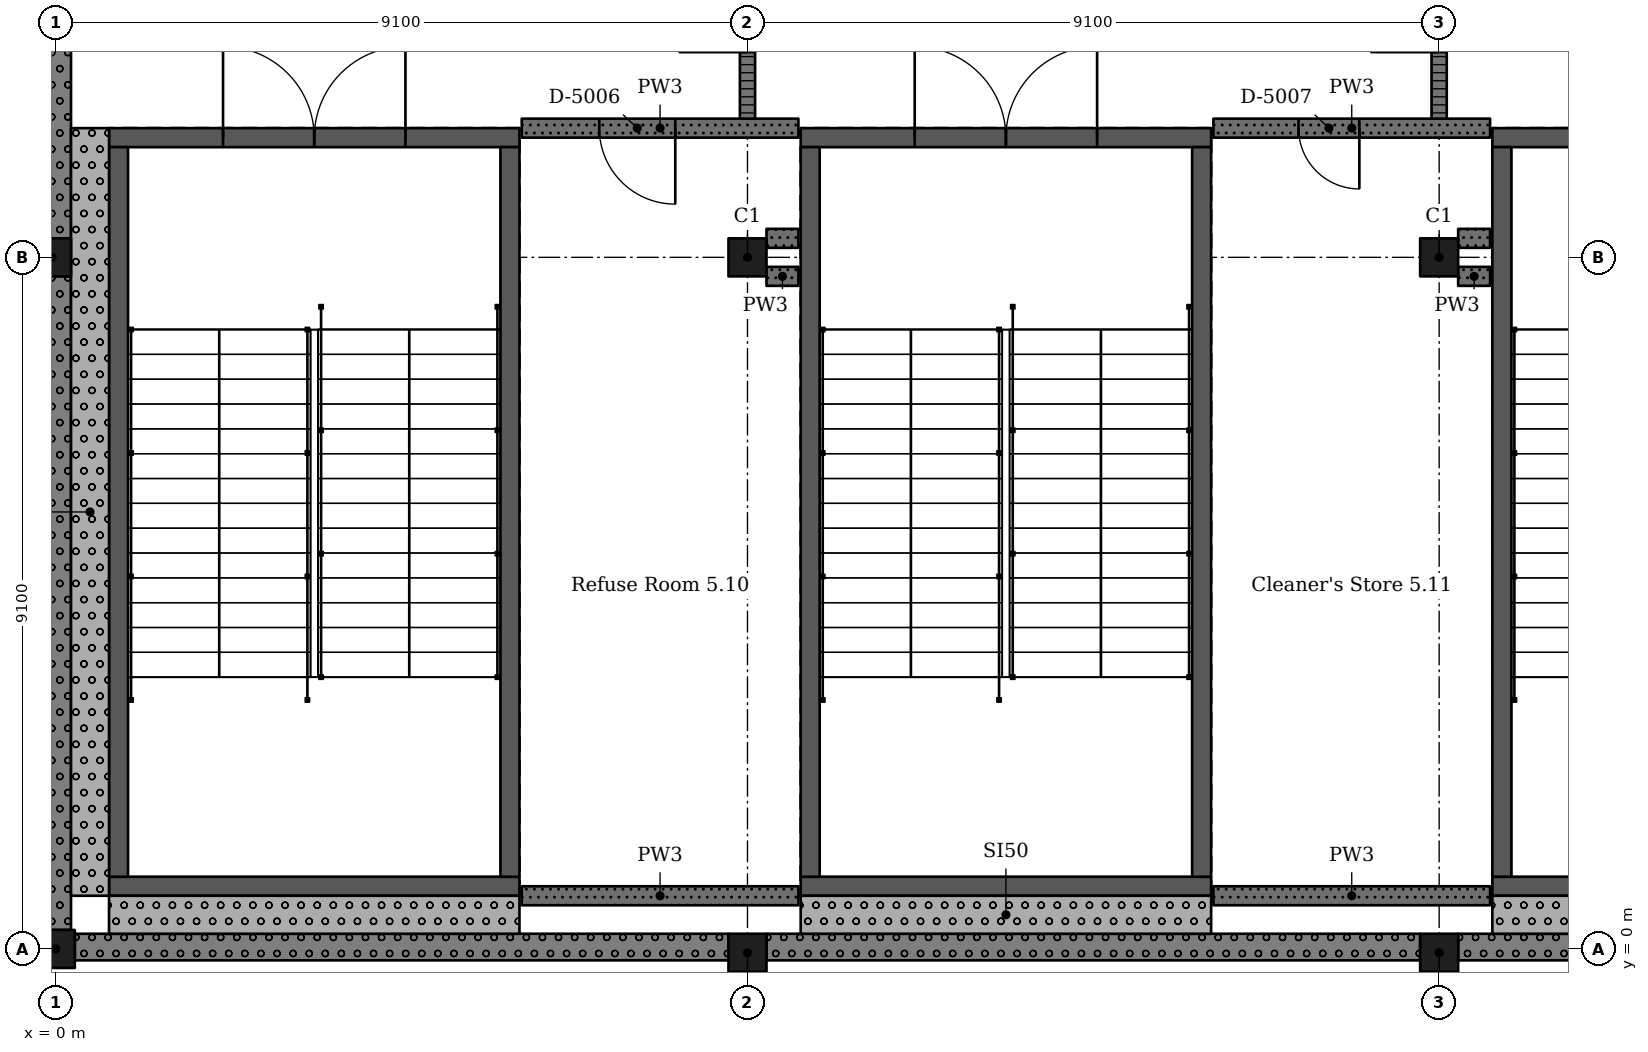
"""IFC4 building model, lengths in metres.
Left out: names, types, materials, properties, quantities, classifications, styles, units other than length and angle.
Written with IfcOpenShell. Run it as: python <this file> out.ifc"""

import sys

from ifc_helpers import new_model, si_unit, direction, frame, frame_2d, origin, origin_2d, place, context, subcontext, project, spatial, rectangle, extrude, element, fill, save


model = new_model("IFC4")
c1 = context("Model", 3, precision=1e-05, world=origin(), true_north=direction((0.0, 1.0)))
c2 = subcontext(c1, "Body", "Model", "MODEL_VIEW")
j1 = project(units=[si_unit("LENGTHUNIT", "METRE"), si_unit("PLANEANGLEUNIT", "RADIAN")], contexts=[c1])
p1 = place(None, origin())
s1 = spatial("IfcSite", under=j1, at=p1, CompositionType="ELEMENT")
p2 = place(p1, origin())
s2 = spatial("IfcBuilding", under=s1, at=p2, CompositionType="ELEMENT")
p3 = place(p2, frame((0.0, 0.0, 24.57)))
s3 = spatial("IfcBuildingStorey", under=s2, at=p3, CompositionType="ELEMENT", Elevation=24.57)
for number, where, z_axis, x_axis in (
    (1, (0.0, 0.0, 0.0), (0.0, 0.0, 1.0), (1.0, 0.0, 0.0)),
    (2, (-0.05, 9.1, 0.0), (0.0, 0.0, 1.0), (1.0, 0.0, 0.0)),
    (3, (9.1, -0.05, 0.0), (0.0, 0.0, 1.0), (1.0, 0.0, 0.0)),
    (4, (9.1, 9.1, 0.0), (0.0, 0.0, 1.0), (1.0, 0.0, 0.0)),
    (5, (18.2, -0.05, 0.0), (0.0, 0.0, 1.0), (1.0, 0.0, 0.0)),
    (6, (18.2, 9.1, 0.0), (0.0, 0.0, 1.0), (1.0, 0.0, 0.0)),
):
    element("IfcColumn", number, at=place(p3, frame(where, z_axis=z_axis, x_axis=x_axis)), inside=s3, PredefinedType="COLUMN", context=c2, shape_type="SweptSolid", body=[
        extrude(rectangle(XDim=0.5, YDim=0.5, at=origin_2d()), origin(), (0.0, 0.0, 1.0), 4.55),
    ])
p4 = place(p3, frame((6.1, 0.825, 0.0), z_axis=(0.0, 0.0, 1.0), x_axis=(-1.0, 0.0, 0.0)))
e7 = element("IfcWall", 7, at=p4, inside=s3, PredefinedType="SHEAR", context=c2, shape_type="SweptSolid", body=[
    extrude(rectangle(XDim=5.4, YDim=0.25, at=frame_2d((2.7, 0.0))), origin(), (0.0, 0.0, 1.0), 4.55),
])
p5 = place(p3, frame((6.1, 10.675, 0.0), z_axis=(0.0, 0.0, 1.0), x_axis=(-1.0, 0.0, 0.0)))
e8 = element("IfcWall", 8, at=p5, inside=s3, PredefinedType="SHEAR", context=c2, shape_type="SweptSolid", body=[
    extrude(rectangle(XDim=5.4, YDim=0.25, at=frame_2d((2.7, 0.0))), origin(), (0.0, 0.0, 1.0), 4.55),
])
p6 = place(p5, frame((1.5, 0.0, 0.0)))
e9 = element("IfcOpeningElement", 9, at=p6, cuts=e8, PredefinedType="OPENING", context=c2, shape_type="SweptSolid", body=[
    extrude(rectangle(XDim=2.4, YDim=2.1, at=frame_2d((1.2, 1.05))), frame((0.0, 0.135, 0.0), z_axis=(0.0, -1.0, 0.0), x_axis=(1.0, 0.0, 0.0)), (0.0, 0.0, 1.0), 0.27),
])
for number, where, z_axis, x_axis in (
    (10, (0.825, 10.55, 0.0), (0.0, 0.0, 1.0), (0.0, -1.0, 0.0)),
    (11, (5.975, 10.55, 0.0), (0.0, 0.0, 1.0), (0.0, -1.0, 0.0)),
):
    element("IfcWall", number, at=place(p3, frame(where, z_axis=z_axis, x_axis=x_axis)), inside=s3, PredefinedType="SHEAR", context=c2, shape_type="SweptSolid", body=[
        extrude(rectangle(XDim=9.6, YDim=0.25, at=frame_2d((4.8, 0.0))), origin(), (0.0, 0.0, 1.0), 4.55),
    ])
p7 = place(p3, frame((15.2, 0.825, 0.0), z_axis=(0.0, 0.0, 1.0), x_axis=(-1.0, 0.0, 0.0)))
e12 = element("IfcWall", 12, at=p7, inside=s3, PredefinedType="SHEAR", context=c2, shape_type="SweptSolid", body=[
    extrude(rectangle(XDim=5.4, YDim=0.25, at=frame_2d((2.7, 0.0))), origin(), (0.0, 0.0, 1.0), 4.55),
])
p8 = place(p3, frame((15.2, 10.675, 0.0), z_axis=(0.0, 0.0, 1.0), x_axis=(-1.0, 0.0, 0.0)))
e13 = element("IfcWall", 13, at=p8, inside=s3, PredefinedType="SHEAR", context=c2, shape_type="SweptSolid", body=[
    extrude(rectangle(XDim=5.4, YDim=0.25, at=frame_2d((2.7, 0.0))), origin(), (0.0, 0.0, 1.0), 4.55),
])
p9 = place(p8, frame((1.5, 0.0, 0.0)))
e14 = element("IfcOpeningElement", 14, at=p9, cuts=e13, PredefinedType="OPENING", context=c2, shape_type="SweptSolid", body=[
    extrude(rectangle(XDim=2.4, YDim=2.1, at=frame_2d((1.2, 1.05))), frame((0.0, 0.135, 0.0), z_axis=(0.0, -1.0, 0.0), x_axis=(1.0, 0.0, 0.0)), (0.0, 0.0, 1.0), 0.27),
])
for number, where, z_axis, x_axis in (
    (15, (9.925, 10.55, 0.0), (0.0, 0.0, 1.0), (0.0, -1.0, 0.0)),
    (16, (15.075, 10.55, 0.0), (0.0, 0.0, 1.0), (0.0, -1.0, 0.0)),
):
    element("IfcWall", number, at=place(p3, frame(where, z_axis=z_axis, x_axis=x_axis)), inside=s3, PredefinedType="SHEAR", context=c2, shape_type="SweptSolid", body=[
        extrude(rectangle(XDim=9.6, YDim=0.25, at=frame_2d((4.8, 0.0))), origin(), (0.0, 0.0, 1.0), 4.55),
    ])
p10 = place(p3, frame((24.3, 0.825, 0.0), z_axis=(0.0, 0.0, 1.0), x_axis=(-1.0, 0.0, 0.0)))
e17 = element("IfcWall", 17, at=p10, inside=s3, PredefinedType="SHEAR", context=c2, shape_type="SweptSolid", body=[
    extrude(rectangle(XDim=5.4, YDim=0.25, at=frame_2d((2.7, 0.0))), origin(), (0.0, 0.0, 1.0), 4.55),
])
p11 = place(p3, frame((24.3, 10.675, 0.0), z_axis=(0.0, 0.0, 1.0), x_axis=(-1.0, 0.0, 0.0)))
e18 = element("IfcWall", 18, at=p11, inside=s3, PredefinedType="SHEAR", context=c2, shape_type="SweptSolid", body=[
    extrude(rectangle(XDim=5.4, YDim=0.25, at=frame_2d((2.7, 0.0))), origin(), (0.0, 0.0, 1.0), 4.55),
])
p12 = place(p11, frame((1.5, 0.0, 0.0)))
e19 = element("IfcOpeningElement", 19, at=p12, cuts=e18, PredefinedType="OPENING", context=c2, shape_type="SweptSolid", body=[
    extrude(rectangle(XDim=2.4, YDim=2.1, at=frame_2d((1.2, 1.05))), frame((0.0, 0.135, 0.0), z_axis=(0.0, -1.0, 0.0), x_axis=(1.0, 0.0, 0.0)), (0.0, 0.0, 1.0), 0.27),
])
p13 = place(p3, frame((19.025, 10.55, 0.0), z_axis=(0.0, 0.0, 1.0), x_axis=(0.0, -1.0, 0.0)))
e20 = element("IfcWall", 20, at=p13, inside=s3, PredefinedType="SHEAR", context=c2, shape_type="SweptSolid", body=[
    extrude(rectangle(XDim=9.6, YDim=0.25, at=frame_2d((4.8, 0.0))), origin(), (0.0, 0.0, 1.0), 4.55),
])
p14 = place(p3, frame((0.25, 0.025, 0.0), z_axis=(0.0, 0.0, 1.0), x_axis=(1.0, 0.0, 0.0)))
e21 = element("IfcWall", 21, at=p14, inside=s3, PredefinedType="SOLIDWALL", context=c2, shape_type="SweptSolid", body=[
    extrude(rectangle(XDim=8.6, YDim=0.35, at=frame_2d((4.3, 0.0))), origin(), (0.0, 0.0, 1.0), 3.6),
])
p15 = place(p3, frame((9.35, 0.025, 0.0), z_axis=(0.0, 0.0, 1.0), x_axis=(1.0, 0.0, 0.0)))
e22 = element("IfcWall", 22, at=p15, inside=s3, PredefinedType="SOLIDWALL", context=c2, shape_type="SweptSolid", body=[
    extrude(rectangle(XDim=8.6, YDim=0.35, at=frame_2d((4.3, 0.0))), origin(), (0.0, 0.0, 1.0), 3.6),
])
p16 = place(p3, frame((18.45, 0.025, 0.0), z_axis=(0.0, 0.0, 1.0), x_axis=(1.0, 0.0, 0.0)))
e23 = element("IfcWall", 23, at=p16, inside=s3, PredefinedType="SOLIDWALL", context=c2, shape_type="SweptSolid", body=[
    extrude(rectangle(XDim=8.6, YDim=0.35, at=frame_2d((4.3, 0.0))), origin(), (0.0, 0.0, 1.0), 3.6),
])
p17 = place(p3, frame((0.025, 17.95, 0.0), z_axis=(0.0, 0.0, 1.0), x_axis=(0.0, -1.0, 0.0)))
e24 = element("IfcWall", 24, at=p17, inside=s3, PredefinedType="SOLIDWALL", context=c2, shape_type="SweptSolid", body=[
    extrude(rectangle(XDim=8.6, YDim=0.35, at=frame_2d((4.3, 0.0))), origin(), (0.0, 0.0, 1.0), 3.6),
])
p18 = place(p3, frame((0.025, 8.85, 0.0), z_axis=(0.0, 0.0, 1.0), x_axis=(0.0, -1.0, 0.0)))
e25 = element("IfcWall", 25, at=p18, inside=s3, PredefinedType="SOLIDWALL", context=c2, shape_type="SweptSolid", body=[
    extrude(rectangle(XDim=8.6, YDim=0.35, at=frame_2d((4.3, 0.0))), origin(), (0.0, 0.0, 1.0), 3.6),
])
p19 = place(p3, frame((0.7, 0.45, 0.0), z_axis=(0.0, 0.0, 1.0), x_axis=(1.0, 0.0, 0.0)))
e26 = element("IfcWall", 26, at=p19, inside=s3, PredefinedType="SOLIDWALL", context=c2, shape_type="SweptSolid", body=[
    extrude(rectangle(XDim=5.4, YDim=0.5, at=frame_2d((2.7, 0.0))), origin(), (0.0, 0.0, 1.0), 4.35),
])
p20 = place(p3, frame((0.45, 0.7, 0.0), z_axis=(0.0, 0.0, 1.0), x_axis=(0.0, 1.0, 0.0)))
e27 = element("IfcWall", 27, at=p20, inside=s3, PredefinedType="SOLIDWALL", context=c2, shape_type="SweptSolid", body=[
    extrude(rectangle(XDim=10.1, YDim=0.5, at=frame_2d((5.05, 0.0))), origin(), (0.0, 0.0, 1.0), 4.35),
])
p21 = place(p3, frame((9.8, 0.45, 0.0), z_axis=(0.0, 0.0, 1.0), x_axis=(1.0, 0.0, 0.0)))
e28 = element("IfcWall", 28, at=p21, inside=s3, PredefinedType="SOLIDWALL", context=c2, shape_type="SweptSolid", body=[
    extrude(rectangle(XDim=5.4, YDim=0.5, at=frame_2d((2.7, 0.0))), origin(), (0.0, 0.0, 1.0), 4.35),
])
p22 = place(p3, frame((18.9, 0.45, 0.0), z_axis=(0.0, 0.0, 1.0), x_axis=(1.0, 0.0, 0.0)))
e29 = element("IfcWall", 29, at=p22, inside=s3, PredefinedType="SOLIDWALL", context=c2, shape_type="SweptSolid", body=[
    extrude(rectangle(XDim=5.4, YDim=0.5, at=frame_2d((2.7, 0.0))), origin(), (0.0, 0.0, 1.0), 4.35),
])
p23 = place(p3, frame((6.13, 10.8, 0.0), z_axis=(0.0, 0.0, 1.0), x_axis=(1.0, 0.0, 0.0)))
e30 = element("IfcWall", 30, at=p23, inside=s3, PredefinedType="SOLIDWALL", context=c2, shape_type="SweptSolid", body=[
    extrude(rectangle(XDim=3.64, YDim=0.25, at=frame_2d((1.82, 0.0))), origin(), (0.0, 0.0, 1.0), 4.35),
])
p24 = place(p23, frame((1.02, 0.0, 0.0)))
e31 = element("IfcOpeningElement", 31, at=p24, cuts=e30, PredefinedType="OPENING", context=c2, shape_type="SweptSolid", body=[
    extrude(rectangle(XDim=1.0, YDim=2.1, at=frame_2d((0.5, 1.05))), frame((0.0, 0.135, 0.0), z_axis=(0.0, -1.0, 0.0), x_axis=(1.0, 0.0, 0.0)), (0.0, 0.0, 1.0), 0.27),
])
p25 = place(p3, frame((9.1, 17.95, 0.0), z_axis=(0.0, 0.0, 1.0), x_axis=(0.0, -1.0, 0.0)))
e32 = element("IfcWall", 32, at=p25, inside=s3, PredefinedType="PARTITIONING", context=c2, shape_type="SweptSolid", body=[
    extrude(rectangle(XDim=7.025, YDim=0.2, at=frame_2d((3.512, 0.0))), origin(), (0.0, 0.0, 1.0), 3.6),
])
p26 = place(p25, frame((0.85, 0.0, 0.0)))
e33 = element("IfcOpeningElement", 33, at=p26, cuts=e32, PredefinedType="OPENING", context=c2, shape_type="SweptSolid", body=[
    extrude(rectangle(XDim=1.8, YDim=2.4, at=frame_2d((0.9, 1.2))), frame((0.0, 0.11, 0.0), z_axis=(0.0, -1.0, 0.0), x_axis=(1.0, 0.0, 0.0)), (0.0, 0.0, 1.0), 0.22),
])
p27 = place(p25, frame((4.35, 0.0, 0.0)))
e34 = element("IfcOpeningElement", 34, at=p27, cuts=e32, PredefinedType="OPENING", context=c2, shape_type="SweptSolid", body=[
    extrude(rectangle(XDim=1.8, YDim=2.4, at=frame_2d((0.9, 1.2))), frame((0.0, 0.11, 0.0), z_axis=(0.0, -1.0, 0.0), x_axis=(1.0, 0.0, 0.0)), (0.0, 0.0, 1.0), 0.22),
])
p28 = place(p3, frame((9.35, 8.85, 0.0), z_axis=(0.0, 0.0, 1.0), x_axis=(1.0, 0.0, 0.0)))
e35 = element("IfcWall", 35, at=p28, inside=s3, PredefinedType="SOLIDWALL", context=c2, shape_type="SweptSolid", body=[
    extrude(rectangle(XDim=0.42, YDim=0.25, at=frame_2d((0.21, 0.0))), origin(), (0.0, 0.0, 1.0), 4.35),
])
p29 = place(p3, frame((9.77, 0.7, 0.0), z_axis=(0.0, 0.0, 1.0), x_axis=(-1.0, 0.0, 0.0)))
e36 = element("IfcWall", 36, at=p29, inside=s3, PredefinedType="SOLIDWALL", context=c2, shape_type="SweptSolid", body=[
    extrude(rectangle(XDim=3.64, YDim=0.25, at=frame_2d((1.82, 0.0))), origin(), (0.0, 0.0, 1.0), 4.35),
])
p30 = place(p3, frame((9.77, 9.35, 0.0), z_axis=(0.0, 0.0, 1.0), x_axis=(-1.0, 0.0, 0.0)))
e37 = element("IfcWall", 37, at=p30, inside=s3, PredefinedType="SOLIDWALL", context=c2, shape_type="SweptSolid", body=[
    extrude(rectangle(XDim=0.42, YDim=0.25, at=frame_2d((0.21, 0.0))), origin(), (0.0, 0.0, 1.0), 4.35),
])
p31 = place(p3, frame((15.23, 10.8, 0.0), z_axis=(0.0, 0.0, 1.0), x_axis=(1.0, 0.0, 0.0)))
e38 = element("IfcWall", 38, at=p31, inside=s3, PredefinedType="SOLIDWALL", context=c2, shape_type="SweptSolid", body=[
    extrude(rectangle(XDim=3.64, YDim=0.25, at=frame_2d((1.82, 0.0))), origin(), (0.0, 0.0, 1.0), 4.35),
])
p32 = place(p31, frame((1.12, 0.0, 0.0)))
e39 = element("IfcOpeningElement", 39, at=p32, cuts=e38, PredefinedType="OPENING", context=c2, shape_type="SweptSolid", body=[
    extrude(rectangle(XDim=0.8, YDim=2.1, at=frame_2d((0.4, 1.05))), frame((0.0, 0.135, 0.0), z_axis=(0.0, -1.0, 0.0), x_axis=(1.0, 0.0, 0.0)), (0.0, 0.0, 1.0), 0.27),
])
p33 = place(p3, frame((18.2, 17.95, 0.0), z_axis=(0.0, 0.0, 1.0), x_axis=(0.0, -1.0, 0.0)))
e40 = element("IfcWall", 40, at=p33, inside=s3, PredefinedType="PARTITIONING", context=c2, shape_type="SweptSolid", body=[
    extrude(rectangle(XDim=7.025, YDim=0.2, at=frame_2d((3.512, 0.0))), origin(), (0.0, 0.0, 1.0), 3.6),
])
p34 = place(p33, frame((0.85, 0.0, 0.0)))
e41 = element("IfcOpeningElement", 41, at=p34, cuts=e40, PredefinedType="OPENING", context=c2, shape_type="SweptSolid", body=[
    extrude(rectangle(XDim=1.8, YDim=2.4, at=frame_2d((0.9, 1.2))), frame((0.0, 0.11, 0.0), z_axis=(0.0, -1.0, 0.0), x_axis=(1.0, 0.0, 0.0)), (0.0, 0.0, 1.0), 0.22),
])
p35 = place(p33, frame((4.35, 0.0, 0.0)))
e42 = element("IfcOpeningElement", 42, at=p35, cuts=e40, PredefinedType="OPENING", context=c2, shape_type="SweptSolid", body=[
    extrude(rectangle(XDim=1.8, YDim=2.4, at=frame_2d((0.9, 1.2))), frame((0.0, 0.11, 0.0), z_axis=(0.0, -1.0, 0.0), x_axis=(1.0, 0.0, 0.0)), (0.0, 0.0, 1.0), 0.22),
])
p36 = place(p3, frame((18.45, 8.85, 0.0), z_axis=(0.0, 0.0, 1.0), x_axis=(1.0, 0.0, 0.0)))
e43 = element("IfcWall", 43, at=p36, inside=s3, PredefinedType="SOLIDWALL", context=c2, shape_type="SweptSolid", body=[
    extrude(rectangle(XDim=0.42, YDim=0.25, at=frame_2d((0.21, 0.0))), origin(), (0.0, 0.0, 1.0), 4.35),
])
p37 = place(p3, frame((18.87, 0.7, 0.0), z_axis=(0.0, 0.0, 1.0), x_axis=(-1.0, 0.0, 0.0)))
e44 = element("IfcWall", 44, at=p37, inside=s3, PredefinedType="SOLIDWALL", context=c2, shape_type="SweptSolid", body=[
    extrude(rectangle(XDim=3.64, YDim=0.25, at=frame_2d((1.82, 0.0))), origin(), (0.0, 0.0, 1.0), 4.35),
])
p38 = place(p3, frame((18.87, 9.35, 0.0), z_axis=(0.0, 0.0, 1.0), x_axis=(-1.0, 0.0, 0.0)))
e45 = element("IfcWall", 45, at=p38, inside=s3, PredefinedType="SOLIDWALL", context=c2, shape_type="SweptSolid", body=[
    extrude(rectangle(XDim=0.42, YDim=0.25, at=frame_2d((0.21, 0.0))), origin(), (0.0, 0.0, 1.0), 4.35),
])
p39 = place(p24, origin())
e46 = element("IfcDoor", 46, at=p39, inside=s3, OperationType="SINGLE_SWING_RIGHT", PredefinedType="DOOR", context=c2, shape_type="SweptSolid", body=[
    extrude(rectangle(XDim=1.0, YDim=2.1, at=frame_2d((0.5, 1.05))), frame((0.0, 0.025, 0.0), z_axis=(0.0, -1.0, 0.0), x_axis=(1.0, 0.0, 0.0)), (0.0, 0.0, 1.0), 0.05),
])
fill(e31, e46)
p40 = place(p32, origin())
e47 = element("IfcDoor", 47, at=p40, inside=s3, OperationType="SINGLE_SWING_RIGHT", PredefinedType="DOOR", context=c2, shape_type="SweptSolid", body=[
    extrude(rectangle(XDim=0.8, YDim=2.1, at=frame_2d((0.4, 1.05))), frame((0.0, 0.025, 0.0), z_axis=(0.0, -1.0, 0.0), x_axis=(1.0, 0.0, 0.0)), (0.0, 0.0, 1.0), 0.05),
])
fill(e39, e47)
p41 = place(p27, origin())
e48 = element("IfcDoor", 48, at=p41, inside=s3, OperationType="DOUBLE_DOOR_SINGLE_SWING", PredefinedType="DOOR", context=c2, shape_type="SweptSolid", body=[
    extrude(rectangle(XDim=1.8, YDim=2.4, at=frame_2d((0.9, 1.2))), frame((0.0, 0.025, 0.0), z_axis=(0.0, -1.0, 0.0), x_axis=(1.0, 0.0, 0.0)), (0.0, 0.0, 1.0), 0.05),
])
fill(e34, e48)
p42 = place(p35, origin())
e49 = element("IfcDoor", 49, at=p42, inside=s3, OperationType="DOUBLE_DOOR_SINGLE_SWING", PredefinedType="DOOR", context=c2, shape_type="SweptSolid", body=[
    extrude(rectangle(XDim=1.8, YDim=2.4, at=frame_2d((0.9, 1.2))), frame((0.0, 0.025, 0.0), z_axis=(0.0, -1.0, 0.0), x_axis=(1.0, 0.0, 0.0)), (0.0, 0.0, 1.0), 0.05),
])
fill(e42, e49)
p43 = place(p6, origin())
e50 = element("IfcDoor", 50, at=p43, inside=s3, OperationType="DOUBLE_DOOR_SINGLE_SWING", PredefinedType="DOOR", context=c2, shape_type="SweptSolid", body=[
    extrude(rectangle(XDim=2.4, YDim=2.1, at=frame_2d((1.2, 1.05))), frame((0.0, 0.025, 0.0), z_axis=(0.0, -1.0, 0.0), x_axis=(1.0, 0.0, 0.0)), (0.0, 0.0, 1.0), 0.05),
])
fill(e9, e50)
p44 = place(p9, origin())
e51 = element("IfcDoor", 51, at=p44, inside=s3, OperationType="DOUBLE_DOOR_SINGLE_SWING", PredefinedType="DOOR", context=c2, shape_type="SweptSolid", body=[
    extrude(rectangle(XDim=2.4, YDim=2.1, at=frame_2d((1.2, 1.05))), frame((0.0, 0.025, 0.0), z_axis=(0.0, -1.0, 0.0), x_axis=(1.0, 0.0, 0.0)), (0.0, 0.0, 1.0), 0.05),
])
fill(e14, e51)
save(model, sys.argv[1])
